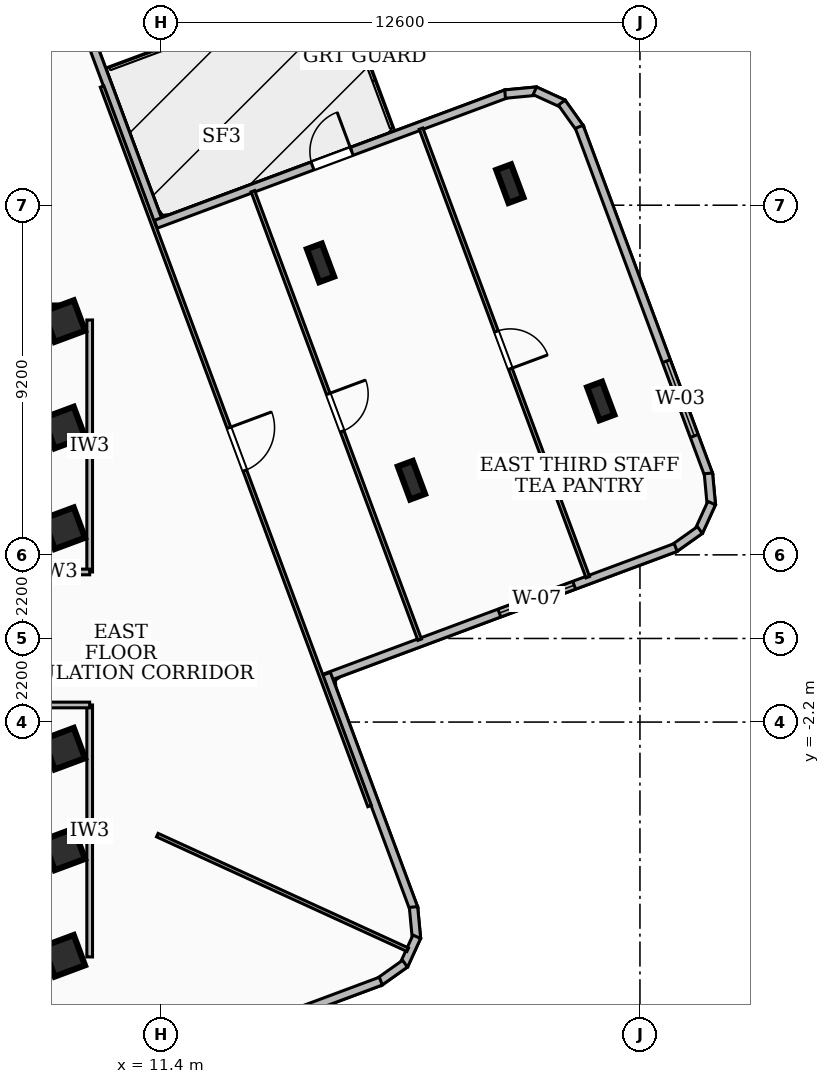
"""IFC4 building model, lengths in metres.
Left out: names, types, materials, properties, quantities, classifications, styles, units other than length and angle.
Written with IfcOpenShell. Run it as: python <this file> out.ifc"""

import sys

from ifc_helpers import new_model, si_unit, direction, frame, frame_2d, origin, origin_2d, place, context, subcontext, project, spatial, rectangle, i_section, extrude, element, fill, save


model = new_model("IFC4")
c1 = context("Model", 3, precision=1e-05, world=origin(), true_north=direction((0.0, 1.0)))
c2 = subcontext(c1, "Body", "Model", "MODEL_VIEW")
j1 = project(units=[si_unit("LENGTHUNIT", "METRE"), si_unit("PLANEANGLEUNIT", "RADIAN")], contexts=[c1])
p1 = place(None, origin())
s1 = spatial("IfcSite", under=j1, at=p1, CompositionType="ELEMENT")
p2 = place(p1, origin())
s2 = spatial("IfcBuilding", under=s1, at=p2, CompositionType="ELEMENT")
p3 = place(p2, frame((0.0, 0.0, 170.28)))
s3 = spatial("IfcBuildingStorey", under=s2, at=p3, CompositionType="ELEMENT", Elevation=170.28)
for number, where, z_axis, x_axis in (
    (1, (-8.78, 8.535, 0.0), (0.0, 0.0, 1.0), (1.0, 0.0, 0.0)),
    (2, (8.78, -8.535, 0.0), (0.0, 0.0, 1.0), (-1.0, 0.0, 0.0)),
):
    element("IfcWall", number, at=place(p3, frame(where, z_axis=z_axis, x_axis=x_axis)), inside=s3, PredefinedType="SHEAR", context=c2, shape_type="SweptSolid", body=[
        extrude(rectangle(XDim=17.56, YDim=0.45, at=frame_2d((8.78, 0.0))), origin(), (0.0, 0.0, 1.0), 3.34),
    ])
for number, where, z_axis, x_axis in (
    (3, (8.85, -5.55, 0.0), (0.0, 0.0, 1.0), (0.937, 0.349, 0.0)),
    (4, (8.85, -2.9, 0.0), (0.0, 0.0, 1.0), (0.937, 0.349, 0.0)),
    (5, (8.85, 2.9, 0.0), (0.0, 0.0, 1.0), (0.937, 0.349, 0.0)),
    (6, (8.85, 5.55, 0.0), (0.0, 0.0, 1.0), (0.937, 0.349, 0.0)),
    (7, (8.85, -8.35, 0.0), (0.0, 0.0, 1.0), (0.937, 0.349, 0.0)),
    (8, (8.85, 8.35, 0.0), (0.0, 0.0, 1.0), (0.937, 0.349, 0.0)),
):
    element("IfcColumn", number, at=place(p3, frame(where, z_axis=z_axis, x_axis=x_axis)), inside=s3, PredefinedType="COLUMN", context=c2, shape_type="SweptSolid", body=[
        extrude(rectangle(XDim=0.85, YDim=0.85, at=origin_2d()), origin(), (0.0, 0.0, 1.0), 3.6),
    ])
for number, where, z_axis, x_axis in (
    (9, (17.987, 4.164, 0.0), (0.0, 0.0, 1.0), (0.937, 0.349, 0.0)),
    (10, (15.594, 9.883, 0.0), (0.0, 0.0, 1.0), (0.937, 0.349, 0.0)),
    (11, (22.968, 6.248, 0.0), (0.0, 0.0, 1.0), (0.937, 0.349, 0.0)),
    (12, (20.576, 11.967, 0.0), (0.0, 0.0, 1.0), (0.937, 0.349, 0.0)),
):
    element("IfcColumn", number, at=place(p3, frame(where, z_axis=z_axis, x_axis=x_axis)), inside=s3, PredefinedType="COLUMN", context=c2, shape_type="SweptSolid", body=[
        extrude(i_section(OverallWidth=0.418, OverallDepth=0.927, WebThickness=0.019, FlangeThickness=0.032, at=origin_2d()), origin(), (0.0, 0.0, 1.0), 3.6),
    ])
p4 = place(p3, frame((9.016, 17.181, 0.0), z_axis=(0.0, 0.0, 1.0), x_axis=(0.34874699486, -0.937216908499, 0.0)))
e13 = element("IfcWall", 13, at=p4, inside=s3, PredefinedType="SOLIDWALL", context=c2, shape_type="SweptSolid", body=[
    extrude(rectangle(XDim=6.758, YDim=0.22, at=frame_2d((3.379, 0.0))), origin(), (0.0, 0.0, 1.0), 2.644),
])
p5 = place(p3, frame((11.26, 10.898, 0.0), z_axis=(0.0, 0.0, 1.0), x_axis=(0.937247074189, 0.348665917354, 0.0)))
e14 = element("IfcWall", 14, at=p5, inside=s3, PredefinedType="SOLIDWALL", context=c2, shape_type="SweptSolid", body=[
    extrude(rectangle(XDim=9.858, YDim=0.22, at=frame_2d((4.929, 0.0))), origin(), (0.0, 0.0, 1.0), 2.644),
])
p6 = place(p5, frame((4.4, 0.0, 0.0)))
e15 = element("IfcOpeningElement", 15, at=p6, cuts=e14, PredefinedType="OPENING", context=c2, shape_type="SweptSolid", body=[
    extrude(rectangle(XDim=1.1, YDim=2.1, at=frame_2d((0.55, 1.05))), frame((0.0, 0.12, 0.0), z_axis=(0.0, -1.0, 0.0), x_axis=(1.0, 0.0, 0.0)), (0.0, 0.0, 1.0), 0.24),
])
p7 = place(p3, frame((20.451, 14.324, 0.0), z_axis=(0.0, 0.0, 1.0), x_axis=(0.99561041007, 0.093594398126, 0.0)))
e16 = element("IfcWall", 16, at=p7, inside=s3, PredefinedType="SOLIDWALL", context=c2, shape_type="SweptSolid", body=[
    extrude(rectangle(XDim=0.835, YDim=0.22, at=frame_2d((0.417, 0.0))), origin(), (0.0, 0.0, 1.0), 3.34),
])
p8 = place(p3, frame((21.234, 14.41, 0.0), z_axis=(0.0, 0.0, 1.0), x_axis=(0.909384320786, -0.415956917371, 0.0)))
e17 = element("IfcWall", 17, at=p8, inside=s3, PredefinedType="SOLIDWALL", context=c2, shape_type="SweptSolid", body=[
    extrude(rectangle(XDim=0.819, YDim=0.22, at=frame_2d((0.41, 0.0))), origin(), (0.0, 0.0, 1.0), 3.34),
])
p9 = place(p3, frame((21.941, 14.099, 0.0), z_axis=(0.0, 0.0, 1.0), x_axis=(0.581210523844, -0.813753234693, 0.0)))
e18 = element("IfcWall", 18, at=p9, inside=s3, PredefinedType="SOLIDWALL", context=c2, shape_type="SweptSolid", body=[
    extrude(rectangle(XDim=0.835, YDim=0.22, at=frame_2d((0.417, 0.0))), origin(), (0.0, 0.0, 1.0), 3.34),
])
p10 = place(p3, frame((22.402, 13.463, 0.0), z_axis=(0.0, 0.0, 1.0), x_axis=(0.348638358175, -0.937257326037, 0.0)))
e19 = element("IfcWall", 19, at=p10, inside=s3, PredefinedType="SOLIDWALL", context=c2, shape_type="SweptSolid", body=[
    extrude(rectangle(XDim=9.781, YDim=0.22, at=frame_2d((4.89, 0.0))), origin(), (0.0, 0.0, 1.0), 3.34),
])
p11 = place(p10, frame((6.579, 0.0, 0.85)))
e20 = element("IfcOpeningElement", 20, at=p11, cuts=e19, PredefinedType="OPENING", context=c2, shape_type="SweptSolid", body=[
    extrude(rectangle(XDim=2.1, YDim=2.0, at=frame_2d((1.05, 1.0))), frame((0.0, 0.12, 0.0), z_axis=(0.0, -1.0, 0.0), x_axis=(1.0, 0.0, 0.0)), (0.0, 0.0, 1.0), 0.24),
])
p12 = place(p3, frame((25.801, 4.344, 0.0), z_axis=(0.0, 0.0, 1.0), x_axis=(0.09225198338, -0.995735693627, 0.0)))
e21 = element("IfcWall", 21, at=p12, inside=s3, PredefinedType="SOLIDWALL", context=c2, shape_type="SweptSolid", body=[
    extrude(rectangle(XDim=0.834, YDim=0.22, at=frame_2d((0.417, 0.0))), origin(), (0.0, 0.0, 1.0), 3.34),
])
p13 = place(p3, frame((25.886, 3.562, 0.0), z_axis=(0.0, 0.0, 1.0), x_axis=(-0.41476734413, -0.909927497245, 0.0)))
e22 = element("IfcWall", 22, at=p13, inside=s3, PredefinedType="SOLIDWALL", context=c2, shape_type="SweptSolid", body=[
    extrude(rectangle(XDim=0.82, YDim=0.22, at=frame_2d((0.41, 0.0))), origin(), (0.0, 0.0, 1.0), 3.34),
])
p14 = place(p3, frame((25.576, 2.853, 0.0), z_axis=(0.0, 0.0, 1.0), x_axis=(-0.815453569677, -0.578822490666, 0.0)))
e23 = element("IfcWall", 23, at=p14, inside=s3, PredefinedType="SOLIDWALL", context=c2, shape_type="SweptSolid", body=[
    extrude(rectangle(XDim=0.833, YDim=0.22, at=frame_2d((0.416, 0.0))), origin(), (0.0, 0.0, 1.0), 3.34),
])
p15 = place(p3, frame((24.94, 2.394, 0.0), z_axis=(0.0, 0.0, 1.0), x_axis=(-0.937259115868, -0.348633546468, 0.0)))
e24 = element("IfcWall", 24, at=p15, inside=s3, PredefinedType="SOLIDWALL", context=c2, shape_type="SweptSolid", body=[
    extrude(rectangle(XDim=9.859, YDim=0.22, at=frame_2d((4.929, 0.0))), origin(), (0.0, 0.0, 1.0), 3.34),
])
p16 = place(p15, frame((2.85, 0.0, 0.85)))
e25 = element("IfcOpeningElement", 25, at=p16, cuts=e24, PredefinedType="OPENING", context=c2, shape_type="SweptSolid", body=[
    extrude(rectangle(XDim=2.1, YDim=1.8, at=frame_2d((1.05, 0.9))), frame((0.0, 0.12, 0.0), z_axis=(0.0, -1.0, 0.0), x_axis=(1.0, 0.0, 0.0)), (0.0, 0.0, 1.0), 0.24),
])
p17 = place(p3, frame((15.751, -0.93, 0.0), z_axis=(0.0, 0.0, 1.0), x_axis=(0.348729932868, -0.937223257246, 0.0)))
e26 = element("IfcWall", 26, at=p17, inside=s3, PredefinedType="SOLIDWALL", context=c2, shape_type="SweptSolid", body=[
    extrude(rectangle(XDim=6.598, YDim=0.22, at=frame_2d((3.299, 0.0))), origin(), (0.0, 0.0, 1.0), 3.34),
])
p18 = place(p3, frame((18.041, -7.066, 0.0), z_axis=(0.0, 0.0, 1.0), x_axis=(0.09330446586, -0.995637623159, 0.0)))
e27 = element("IfcWall", 27, at=p18, inside=s3, PredefinedType="SOLIDWALL", context=c2, shape_type="SweptSolid", body=[
    extrude(rectangle(XDim=0.835, YDim=0.22, at=frame_2d((0.417, 0.0))), origin(), (0.0, 0.0, 1.0), 3.34),
])
p19 = place(p3, frame((18.127, -7.849, 0.0), z_axis=(0.0, 0.0, 1.0), x_axis=(-0.415083126143, -0.909783489843, 0.0)))
e28 = element("IfcWall", 28, at=p19, inside=s3, PredefinedType="SOLIDWALL", context=c2, shape_type="SweptSolid", body=[
    extrude(rectangle(XDim=0.819, YDim=0.22, at=frame_2d((0.409, 0.0))), origin(), (0.0, 0.0, 1.0), 3.34),
])
p20 = place(p3, frame((17.817, -8.557, 0.0), z_axis=(0.0, 0.0, 1.0), x_axis=(-0.815315167698, -0.579017424022, 0.0)))
e29 = element("IfcWall", 29, at=p20, inside=s3, PredefinedType="SOLIDWALL", context=c2, shape_type="SweptSolid", body=[
    extrude(rectangle(XDim=0.833, YDim=0.22, at=frame_2d((0.417, 0.0))), origin(), (0.0, 0.0, 1.0), 3.34),
])
p21 = place(p3, frame((17.181, -9.016, 0.0), z_axis=(0.0, 0.0, 1.0), x_axis=(-0.937216908499, -0.34874699486, 0.0)))
e30 = element("IfcWall", 30, at=p21, inside=s3, PredefinedType="SOLIDWALL", context=c2, shape_type="SweptSolid", body=[
    extrude(rectangle(XDim=6.758, YDim=0.22, at=frame_2d((3.379, 0.0))), origin(), (0.0, 0.0, 1.0), 3.34),
])
p22 = place(p3, frame((9.52, 1.75, 0.0), z_axis=(0.0, 0.0, 1.0), x_axis=(0.0, 1.0, 0.0)))
e31 = element("IfcWall", 31, at=p22, inside=s3, PredefinedType="PARTITIONING", context=c2, shape_type="SweptSolid", body=[
    extrude(rectangle(XDim=6.63, YDim=0.15, at=frame_2d((3.315, 0.0))), origin(), (0.0, 0.0, 1.0), 2.644),
])
p23 = place(p3, frame((7.85, 1.75, 0.0), z_axis=(0.0, 0.0, 1.0), x_axis=(1.0, 0.0, 0.0)))
e32 = element("IfcWall", 32, at=p23, inside=s3, PredefinedType="PARTITIONING", context=c2, shape_type="SweptSolid", body=[
    extrude(rectangle(XDim=1.67, YDim=0.15, at=frame_2d((0.835, 0.0))), origin(), (0.0, 0.0, 1.0), 2.57),
])
p24 = place(p3, frame((9.52, -8.38, 0.0), z_axis=(0.0, 0.0, 1.0), x_axis=(0.0, 1.0, 0.0)))
e33 = element("IfcWall", 33, at=p24, inside=s3, PredefinedType="PARTITIONING", context=c2, shape_type="SweptSolid", body=[
    extrude(rectangle(XDim=6.63, YDim=0.15, at=frame_2d((3.315, 0.0))), origin(), (0.0, 0.0, 1.0), 3.34),
])
p25 = place(p3, frame((7.85, -1.75, 0.0), z_axis=(0.0, 0.0, 1.0), x_axis=(1.0, 0.0, 0.0)))
e34 = element("IfcWall", 34, at=p25, inside=s3, PredefinedType="PARTITIONING", context=c2, shape_type="SweptSolid", body=[
    extrude(rectangle(XDim=1.67, YDim=0.15, at=frame_2d((0.835, 0.0))), origin(), (0.0, 0.0, 1.0), 2.57),
])
p26 = place(p3, frame((11.3, -5.174, 0.0), z_axis=(0.0, 0.0, 1.0), x_axis=(0.909275268701, -0.416195249528, 0.0)))
e35 = element("IfcWall", 35, at=p26, inside=s3, PredefinedType="PARTITIONING", context=c2, shape_type="SweptSolid", body=[
    extrude(rectangle(XDim=7.246, YDim=0.1, at=frame_2d((3.623, 0.0))), origin(), (0.0, 0.0, 1.0), 3.34),
])
p27 = place(p3, frame((9.846, 14.522, 0.0), z_axis=(0.0, 0.0, 1.0), x_axis=(0.348543090668, -0.937292757866, 0.0)))
e36 = element("IfcWall", 36, at=p27, inside=s3, PredefinedType="PARTITIONING", context=c2, shape_type="SweptSolid", body=[
    extrude(rectangle(XDim=20.198, YDim=0.1, at=frame_2d((10.099, 0.0))), origin(), (0.0, 0.0, 1.0), 2.644),
])
p28 = place(p27, frame((9.579, 0.0, 0.0)))
e37 = element("IfcOpeningElement", 37, at=p28, cuts=e36, PredefinedType="OPENING", context=c2, shape_type="SweptSolid", body=[
    extrude(rectangle(XDim=1.2, YDim=2.1, at=frame_2d((0.6, 1.05))), frame((0.0, 0.06, 0.0), z_axis=(0.0, -1.0, 0.0), x_axis=(1.0, 0.0, 0.0)), (0.0, 0.0, 1.0), 0.12),
])
p29 = place(p3, frame((13.814, 11.768, 0.0), z_axis=(0.0, 0.0, 1.0), x_axis=(0.348608135993, -0.937268567445, 0.0)))
e38 = element("IfcWall", 38, at=p29, inside=s3, PredefinedType="PARTITIONING", context=c2, shape_type="SweptSolid", body=[
    extrude(rectangle(XDim=12.59, YDim=0.1, at=frame_2d((6.295, 0.0))), origin(), (0.0, 0.0, 1.0), 2.644),
])
p30 = place(p29, frame((5.69, 0.0, 0.0)))
e39 = element("IfcOpeningElement", 39, at=p30, cuts=e38, PredefinedType="OPENING", context=c2, shape_type="SweptSolid", body=[
    extrude(rectangle(XDim=1.05, YDim=2.08, at=frame_2d((0.525, 1.04))), frame((0.0, 0.06, 0.0), z_axis=(0.0, -1.0, 0.0), x_axis=(1.0, 0.0, 0.0)), (0.0, 0.0, 1.0), 0.12),
])
p31 = place(p3, frame((18.239, 13.414, 0.0), z_axis=(0.0, 0.0, 1.0), x_axis=(0.348514653153, -0.937303332192, 0.0)))
e40 = element("IfcWall", 40, at=p31, inside=s3, PredefinedType="PARTITIONING", context=c2, shape_type="SweptSolid", body=[
    extrude(rectangle(XDim=12.59, YDim=0.1, at=frame_2d((6.295, 0.0))), origin(), (0.0, 0.0, 1.0), 2.644),
])
p32 = place(p31, frame((5.691, 0.0, 0.0)))
e41 = element("IfcOpeningElement", 41, at=p32, cuts=e40, PredefinedType="OPENING", context=c2, shape_type="SweptSolid", body=[
    extrude(rectangle(XDim=1.05, YDim=2.08, at=frame_2d((0.525, 1.04))), frame((0.0, 0.06, 0.0), z_axis=(0.0, -1.0, 0.0), x_axis=(1.0, 0.0, 0.0)), (0.0, 0.0, 1.0), 0.12),
])
p33 = place(p6, origin())
e42 = element("IfcDoor", 42, at=p33, inside=s3, OperationType="SINGLE_SWING_RIGHT", PredefinedType="DOOR", context=c2, shape_type="SweptSolid", body=[
    extrude(rectangle(XDim=1.1, YDim=2.1, at=frame_2d((0.55, 1.05))), frame((0.0, 0.025, 0.0), z_axis=(0.0, -1.0, 0.0), x_axis=(1.0, 0.0, 0.0)), (0.0, 0.0, 1.0), 0.05),
])
fill(e15, e42)
p34 = place(p11, origin())
e43 = element("IfcWindow", 43, at=p34, inside=s3, PartitioningType="SINGLE_PANEL", PredefinedType="WINDOW", context=c2, shape_type="SweptSolid", body=[
    extrude(rectangle(XDim=2.1, YDim=2.0, at=frame_2d((1.05, 1.0))), frame((0.0, 0.03, 0.0), z_axis=(0.0, -1.0, 0.0), x_axis=(1.0, 0.0, 0.0)), (0.0, 0.0, 1.0), 0.06),
])
fill(e20, e43)
p35 = place(p16, origin())
e44 = element("IfcWindow", 44, at=p35, inside=s3, PartitioningType="SINGLE_PANEL", PredefinedType="WINDOW", context=c2, shape_type="SweptSolid", body=[
    extrude(rectangle(XDim=2.1, YDim=1.8, at=frame_2d((1.05, 0.9))), frame((0.0, 0.03, 0.0), z_axis=(0.0, -1.0, 0.0), x_axis=(1.0, 0.0, 0.0)), (0.0, 0.0, 1.0), 0.06),
])
fill(e25, e44)
p36 = place(p28, origin())
e45 = element("IfcDoor", 45, at=p36, inside=s3, OperationType="SINGLE_SWING_LEFT", PredefinedType="DOOR", context=c2, shape_type="SweptSolid", body=[
    extrude(rectangle(XDim=1.2, YDim=2.1, at=frame_2d((0.6, 1.05))), frame((0.0, 0.025, 0.0), z_axis=(0.0, -1.0, 0.0), x_axis=(1.0, 0.0, 0.0)), (0.0, 0.0, 1.0), 0.05),
])
fill(e37, e45)
p37 = place(p30, origin())
e46 = element("IfcDoor", 46, at=p37, inside=s3, OperationType="SINGLE_SWING_LEFT", PredefinedType="DOOR", context=c2, shape_type="SweptSolid", body=[
    extrude(rectangle(XDim=1.05, YDim=2.08, at=frame_2d((0.525, 1.04))), frame((0.0, 0.025, 0.0), z_axis=(0.0, -1.0, 0.0), x_axis=(1.0, 0.0, 0.0)), (0.0, 0.0, 1.0), 0.05),
])
fill(e39, e46)
p38 = place(p32, origin())
e47 = element("IfcDoor", 47, at=p38, inside=s3, OperationType="SINGLE_SWING_RIGHT", PredefinedType="DOOR", context=c2, shape_type="SweptSolid", body=[
    extrude(rectangle(XDim=1.05, YDim=2.08, at=frame_2d((0.525, 1.04))), frame((0.0, 0.025, 0.0), z_axis=(0.0, -1.0, 0.0), x_axis=(1.0, 0.0, 0.0)), (0.0, 0.0, 1.0), 0.05),
])
fill(e41, e47)
save(model, sys.argv[1])
